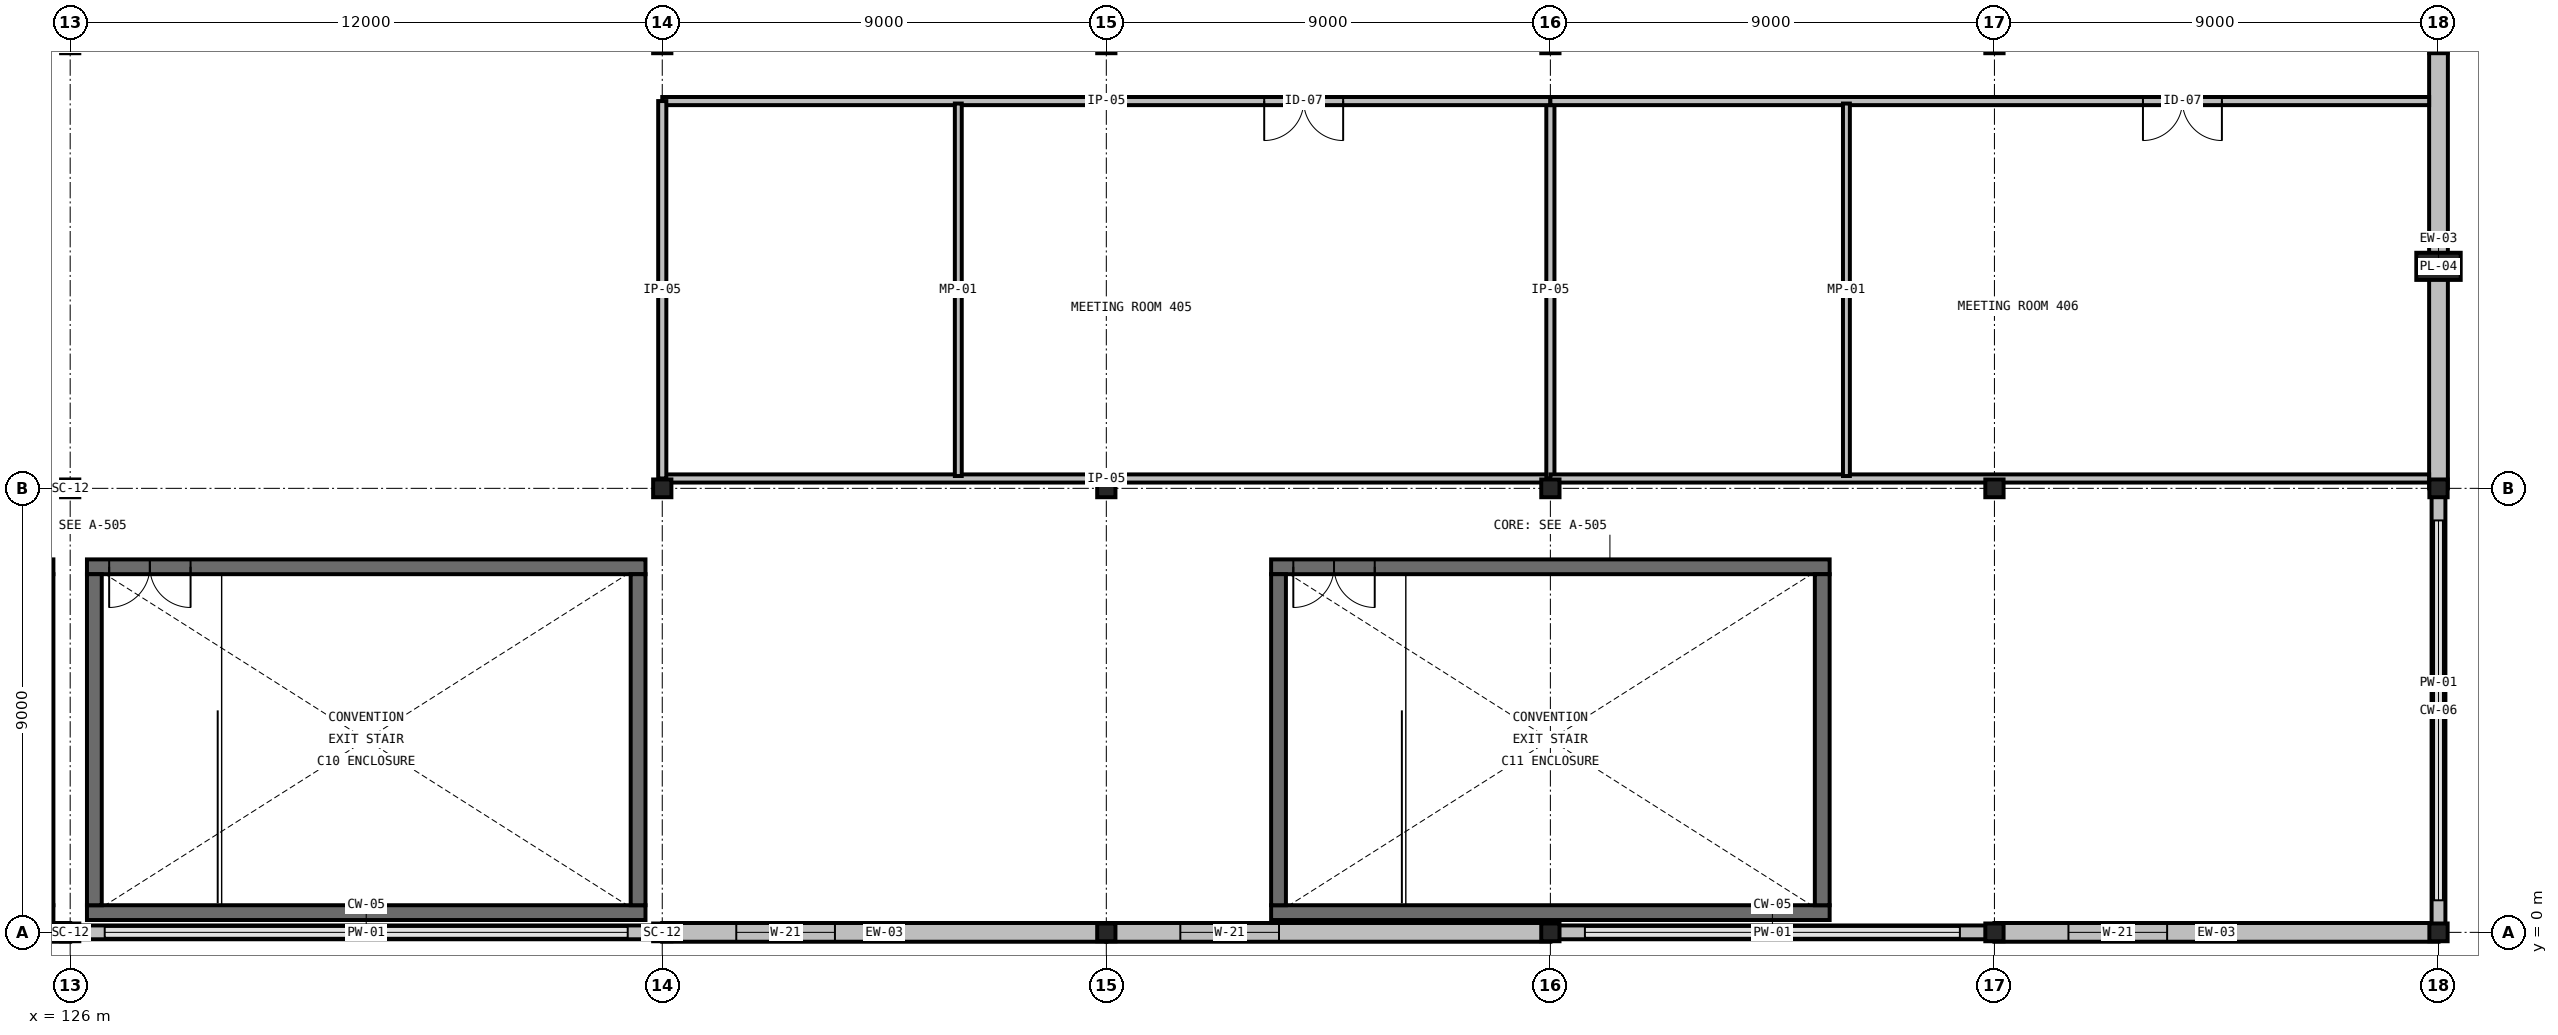
"""IFC4 building model, lengths in metres.
Left out: names, types, materials, properties, quantities, classifications, styles, units other than length and angle.
Written with IfcOpenShell. Run it as: python <this file> out.ifc"""

import sys

from ifc_helpers import new_model, si_unit, direction, frame, frame_2d, origin, origin_2d, place, context, subcontext, project, spatial, rectangle, i_section, extrude, element, fill, save


model = new_model("IFC4")
c1 = context("Model", 3, precision=1e-05, world=origin(), true_north=direction((0.0, 1.0)))
c2 = subcontext(c1, "Body", "Model", "MODEL_VIEW")
j1 = project(units=[si_unit("LENGTHUNIT", "METRE"), si_unit("PLANEANGLEUNIT", "RADIAN")], contexts=[c1])
p1 = place(None, origin())
s1 = spatial("IfcSite", under=j1, at=p1, CompositionType="ELEMENT")
p2 = place(p1, origin())
s2 = spatial("IfcBuilding", under=s1, at=p2, CompositionType="ELEMENT")
p3 = place(p2, frame((0.0, 0.0, 23.4)))
s3 = spatial("IfcBuildingStorey", under=s2, at=p3, CompositionType="ELEMENT", Elevation=23.4)
for number, where, z_axis, x_axis in (
    (1, (126.0, 0.0, 0.0), (0.0, 0.0, 1.0), (1.0, 0.0, 0.0)),
    (2, (126.0, 9.0, 0.0), (0.0, 0.0, 1.0), (1.0, 0.0, 0.0)),
    (3, (126.0, 18.0, 0.0), (0.0, 0.0, 1.0), (1.0, 0.0, 0.0)),
    (4, (138.0, 0.0, 0.0), (0.0, 0.0, 1.0), (1.0, 0.0, 0.0)),
    (5, (138.0, 9.0, 0.0), (0.0, 0.0, 1.0), (1.0, 0.0, 0.0)),
    (6, (138.0, 18.0, 0.0), (0.0, 0.0, 1.0), (1.0, 0.0, 0.0)),
    (7, (147.0, 0.0, 0.0), (0.0, 0.0, 1.0), (1.0, 0.0, 0.0)),
    (8, (147.0, 9.0, 0.0), (0.0, 0.0, 1.0), (1.0, 0.0, 0.0)),
    (9, (147.0, 18.0, 0.0), (0.0, 0.0, 1.0), (1.0, 0.0, 0.0)),
    (10, (156.0, 0.0, 0.0), (0.0, 0.0, 1.0), (1.0, 0.0, 0.0)),
    (11, (156.0, 9.0, 0.0), (0.0, 0.0, 1.0), (1.0, 0.0, 0.0)),
    (12, (156.0, 18.0, 0.0), (0.0, 0.0, 1.0), (1.0, 0.0, 0.0)),
    (13, (165.0, 0.0, 0.0), (0.0, 0.0, 1.0), (1.0, 0.0, 0.0)),
    (14, (165.0, 9.0, 0.0), (0.0, 0.0, 1.0), (1.0, 0.0, 0.0)),
    (15, (165.0, 18.0, 0.0), (0.0, 0.0, 1.0), (1.0, 0.0, 0.0)),
    (16, (174.0, 0.0, 0.0), (0.0, 0.0, 1.0), (1.0, 0.0, 0.0)),
    (17, (174.0, 9.0, 0.0), (0.0, 0.0, 1.0), (1.0, 0.0, 0.0)),
    (18, (174.0, 18.0, 0.0), (0.0, 0.0, 1.0), (1.0, 0.0, 0.0)),
):
    element("IfcColumn", number, at=place(p3, frame(where, z_axis=z_axis, x_axis=x_axis)), inside=s3, PredefinedType="COLUMN", context=c2, shape_type="SweptSolid", body=[
        extrude(i_section(OverallWidth=0.37, OverallDepth=0.36, WebThickness=0.012, FlangeThickness=0.02, FilletRadius=0.031, at=origin_2d()), origin(), (0.0, 0.0, 1.0), 3.85),
    ])
p4 = place(p3, frame((174.0, 13.5, 0.0), z_axis=(0.0, 0.0, 1.0), x_axis=(0.0, 1.0, 0.0)))
e19 = element("IfcColumn", 19, at=p4, inside=s3, PredefinedType="PILASTER", context=c2, shape_type="SweptSolid", body=[
    extrude(rectangle(XDim=0.55, YDim=0.9, at=origin_2d()), origin(), (0.0, 0.0, 1.0), 3.85),
])
p5 = place(p3, frame((125.66, 0.4, 0.0), z_axis=(0.0, 0.0, 1.0), x_axis=(-1.0, 0.0, 0.0)))
e20 = element("IfcWall", 20, at=p5, inside=s3, PredefinedType="SHEAR", context=c2, shape_type="SweptSolid", body=[
    extrude(rectangle(XDim=11.32, YDim=0.3, at=frame_2d((5.66, 0.0))), origin(), (0.0, 0.0, 1.0), 3.85),
])
p6 = place(p3, frame((125.66, 7.41, 0.0), z_axis=(0.0, 0.0, 1.0), x_axis=(-1.0, 0.0, 0.0)))
e21 = element("IfcWall", 21, at=p6, inside=s3, PredefinedType="SHEAR", context=c2, shape_type="SweptSolid", body=[
    extrude(rectangle(XDim=11.32, YDim=0.3, at=frame_2d((5.66, 0.0))), origin(), (0.0, 0.0, 1.0), 3.85),
])
p7 = place(p6, frame((9.22, 0.0, 0.0)))
e22 = element("IfcOpeningElement", 22, at=p7, cuts=e21, PredefinedType="OPENING", context=c2, shape_type="SweptSolid", body=[
    extrude(rectangle(XDim=1.65, YDim=2.25, at=frame_2d((0.825, 1.125))), frame((0.0, 0.165, 0.0), z_axis=(0.0, -1.0, 0.0), x_axis=(1.0, 0.0, 0.0)), (0.0, 0.0, 1.0), 0.33),
])
p8 = place(p3, frame((125.51, 0.55, 0.0), z_axis=(0.0, 0.0, 1.0), x_axis=(0.0, 1.0, 0.0)))
e23 = element("IfcWall", 23, at=p8, inside=s3, PredefinedType="SHEAR", context=c2, shape_type="SweptSolid", body=[
    extrude(rectangle(XDim=6.71, YDim=0.3, at=frame_2d((3.355, 0.0))), origin(), (0.0, 0.0, 1.0), 3.85),
])
p9 = place(p3, frame((137.66, 0.4, 0.0), z_axis=(0.0, 0.0, 1.0), x_axis=(-1.0, 0.0, 0.0)))
e24 = element("IfcWall", 24, at=p9, inside=s3, PredefinedType="SHEAR", context=c2, shape_type="SweptSolid", body=[
    extrude(rectangle(XDim=11.32, YDim=0.3, at=frame_2d((5.66, 0.0))), origin(), (0.0, 0.0, 1.0), 3.85),
])
p10 = place(p3, frame((137.66, 7.41, 0.0), z_axis=(0.0, 0.0, 1.0), x_axis=(-1.0, 0.0, 0.0)))
e25 = element("IfcWall", 25, at=p10, inside=s3, PredefinedType="SHEAR", context=c2, shape_type="SweptSolid", body=[
    extrude(rectangle(XDim=11.32, YDim=0.3, at=frame_2d((5.66, 0.0))), origin(), (0.0, 0.0, 1.0), 3.85),
])
p11 = place(p10, frame((9.22, 0.0, 0.0)))
e26 = element("IfcOpeningElement", 26, at=p11, cuts=e25, PredefinedType="OPENING", context=c2, shape_type="SweptSolid", body=[
    extrude(rectangle(XDim=1.65, YDim=2.25, at=frame_2d((0.825, 1.125))), frame((0.0, 0.165, 0.0), z_axis=(0.0, -1.0, 0.0), x_axis=(1.0, 0.0, 0.0)), (0.0, 0.0, 1.0), 0.33),
])
for number, where, z_axis, x_axis in (
    (27, (126.49, 7.26, 0.0), (0.0, 0.0, 1.0), (0.0, -1.0, 0.0)),
    (28, (137.51, 0.55, 0.0), (0.0, 0.0, 1.0), (0.0, 1.0, 0.0)),
):
    element("IfcWall", number, at=place(p3, frame(where, z_axis=z_axis, x_axis=x_axis)), inside=s3, PredefinedType="SHEAR", context=c2, shape_type="SweptSolid", body=[
        extrude(rectangle(XDim=6.71, YDim=0.3, at=frame_2d((3.355, 0.0))), origin(), (0.0, 0.0, 1.0), 3.85),
    ])
p12 = place(p3, frame((161.66, 0.4, 0.0), z_axis=(0.0, 0.0, 1.0), x_axis=(-1.0, 0.0, 0.0)))
e29 = element("IfcWall", 29, at=p12, inside=s3, PredefinedType="SHEAR", context=c2, shape_type="SweptSolid", body=[
    extrude(rectangle(XDim=11.32, YDim=0.3, at=frame_2d((5.66, 0.0))), origin(), (0.0, 0.0, 1.0), 3.85),
])
p13 = place(p3, frame((161.66, 7.41, 0.0), z_axis=(0.0, 0.0, 1.0), x_axis=(-1.0, 0.0, 0.0)))
e30 = element("IfcWall", 30, at=p13, inside=s3, PredefinedType="SHEAR", context=c2, shape_type="SweptSolid", body=[
    extrude(rectangle(XDim=11.32, YDim=0.3, at=frame_2d((5.66, 0.0))), origin(), (0.0, 0.0, 1.0), 3.85),
])
p14 = place(p13, frame((9.22, 0.0, 0.0)))
e31 = element("IfcOpeningElement", 31, at=p14, cuts=e30, PredefinedType="OPENING", context=c2, shape_type="SweptSolid", body=[
    extrude(rectangle(XDim=1.65, YDim=2.25, at=frame_2d((0.825, 1.125))), frame((0.0, 0.165, 0.0), z_axis=(0.0, -1.0, 0.0), x_axis=(1.0, 0.0, 0.0)), (0.0, 0.0, 1.0), 0.33),
])
for number, where, z_axis, x_axis in (
    (32, (150.49, 7.26, 0.0), (0.0, 0.0, 1.0), (0.0, -1.0, 0.0)),
    (33, (161.51, 0.55, 0.0), (0.0, 0.0, 1.0), (0.0, 1.0, 0.0)),
):
    element("IfcWall", number, at=place(p3, frame(where, z_axis=z_axis, x_axis=x_axis)), inside=s3, PredefinedType="SHEAR", context=c2, shape_type="SweptSolid", body=[
        extrude(rectangle(XDim=6.71, YDim=0.3, at=frame_2d((3.355, 0.0))), origin(), (0.0, 0.0, 1.0), 3.85),
    ])
p15 = place(p3, frame((114.0, 0.0, 0.0), z_axis=(0.0, 0.0, 1.0), x_axis=(1.0, 0.0, 0.0)))
e34 = element("IfcWall", 34, at=p15, inside=s3, PredefinedType="STANDARD", context=c2, shape_type="SweptSolid", body=[
    extrude(rectangle(XDim=12.0, YDim=0.38, at=frame_2d((6.0, 0.0))), origin(), (0.0, 0.0, 1.0), 2.626),
])
p16 = place(p15, frame((1.5, 0.0, 0.85)))
e35 = element("IfcOpeningElement", 35, at=p16, cuts=e34, PredefinedType="OPENING", context=c2, shape_type="SweptSolid", body=[
    extrude(rectangle(XDim=2.0, YDim=1.56, at=frame_2d((1.0, 0.78))), frame((0.0, 0.205, 0.0), z_axis=(0.0, -1.0, 0.0), x_axis=(1.0, 0.0, 0.0)), (0.0, 0.0, 1.0), 0.41),
])
p17 = place(p3, frame((126.0, 0.0, 0.0), z_axis=(0.0, 0.0, 1.0), x_axis=(1.0, 0.0, 0.0)))
e36 = element("IfcWall", 36, at=p17, inside=s3, PredefinedType="PARAPET", context=c2, shape_type="SweptSolid", body=[
    extrude(rectangle(XDim=12.0, YDim=0.28, at=frame_2d((6.0, 0.0))), origin(), (0.0, 0.0, 1.0), 0.2),
])
p18 = place(p3, frame((138.0, 0.0, 0.0), z_axis=(0.0, 0.0, 1.0), x_axis=(1.0, 0.0, 0.0)))
e37 = element("IfcWall", 37, at=p18, inside=s3, PredefinedType="STANDARD", context=c2, shape_type="SweptSolid", body=[
    extrude(rectangle(XDim=9.0, YDim=0.38, at=frame_2d((4.5, 0.0))), origin(), (0.0, 0.0, 1.0), 2.626),
])
p19 = place(p18, frame((1.5, 0.0, 0.85)))
e38 = element("IfcOpeningElement", 38, at=p19, cuts=e37, PredefinedType="OPENING", context=c2, shape_type="SweptSolid", body=[
    extrude(rectangle(XDim=2.0, YDim=1.56, at=frame_2d((1.0, 0.78))), frame((0.0, 0.205, 0.0), z_axis=(0.0, -1.0, 0.0), x_axis=(1.0, 0.0, 0.0)), (0.0, 0.0, 1.0), 0.41),
])
p20 = place(p3, frame((147.0, 0.0, 0.0), z_axis=(0.0, 0.0, 1.0), x_axis=(1.0, 0.0, 0.0)))
e39 = element("IfcWall", 39, at=p20, inside=s3, PredefinedType="STANDARD", context=c2, shape_type="SweptSolid", body=[
    extrude(rectangle(XDim=9.0, YDim=0.38, at=frame_2d((4.5, 0.0))), origin(), (0.0, 0.0, 1.0), 2.626),
])
p21 = place(p20, frame((1.5, 0.0, 0.85)))
e40 = element("IfcOpeningElement", 40, at=p21, cuts=e39, PredefinedType="OPENING", context=c2, shape_type="SweptSolid", body=[
    extrude(rectangle(XDim=2.0, YDim=1.56, at=frame_2d((1.0, 0.78))), frame((0.0, 0.205, 0.0), z_axis=(0.0, -1.0, 0.0), x_axis=(1.0, 0.0, 0.0)), (0.0, 0.0, 1.0), 0.41),
])
p22 = place(p3, frame((156.0, 0.0, 0.0), z_axis=(0.0, 0.0, 1.0), x_axis=(1.0, 0.0, 0.0)))
e41 = element("IfcWall", 41, at=p22, inside=s3, PredefinedType="PARAPET", context=c2, shape_type="SweptSolid", body=[
    extrude(rectangle(XDim=9.0, YDim=0.28, at=frame_2d((4.5, 0.0))), origin(), (0.0, 0.0, 1.0), 0.2),
])
p23 = place(p3, frame((165.0, 0.0, 0.0), z_axis=(0.0, 0.0, 1.0), x_axis=(1.0, 0.0, 0.0)))
e42 = element("IfcWall", 42, at=p23, inside=s3, PredefinedType="STANDARD", context=c2, shape_type="SweptSolid", body=[
    extrude(rectangle(XDim=9.0, YDim=0.38, at=frame_2d((4.5, 0.0))), origin(), (0.0, 0.0, 1.0), 2.626),
])
p24 = place(p23, frame((1.5, 0.0, 0.85)))
e43 = element("IfcOpeningElement", 43, at=p24, cuts=e42, PredefinedType="OPENING", context=c2, shape_type="SweptSolid", body=[
    extrude(rectangle(XDim=2.0, YDim=1.56, at=frame_2d((1.0, 0.78))), frame((0.0, 0.205, 0.0), z_axis=(0.0, -1.0, 0.0), x_axis=(1.0, 0.0, 0.0)), (0.0, 0.0, 1.0), 0.41),
])
p25 = place(p3, frame((174.0, 0.0, 0.0), z_axis=(0.0, 0.0, 1.0), x_axis=(0.0, 1.0, 0.0)))
e44 = element("IfcWall", 44, at=p25, inside=s3, PredefinedType="PARAPET", context=c2, shape_type="SweptSolid", body=[
    extrude(rectangle(XDim=9.0, YDim=0.28, at=frame_2d((4.5, 0.0))), origin(), (0.0, 0.0, 1.0), 0.2),
])
p26 = place(p3, frame((174.0, 9.0, 0.0), z_axis=(0.0, 0.0, 1.0), x_axis=(0.0, 1.0, 0.0)))
e45 = element("IfcWall", 45, at=p26, inside=s3, PredefinedType="STANDARD", context=c2, shape_type="SweptSolid", body=[
    extrude(rectangle(XDim=9.0, YDim=0.38, at=frame_2d((4.5, 0.0))), origin(), (0.0, 0.0, 1.0), 3.119),
])
p27 = place(p3, frame((0.0, 0.14, 3.85), z_axis=(0.0, 0.0, 1.0), x_axis=(1.0, 0.0, 0.0)))
e46 = element("IfcWall", 46, at=p27, inside=s3, PredefinedType="PARAPET", context=c2, shape_type="SweptSolid", body=[
    extrude(rectangle(XDim=174.0, YDim=0.28, at=frame_2d((87.0, 0.0))), origin(), (0.0, 0.0, 1.0), 1.2),
])
p28 = place(p3, frame((173.86, 0.28, 3.85), z_axis=(0.0, 0.0, 1.0), x_axis=(0.0, 1.0, 0.0)))
e47 = element("IfcWall", 47, at=p28, inside=s3, PredefinedType="PARAPET", context=c2, shape_type="SweptSolid", body=[
    extrude(rectangle(XDim=35.44, YDim=0.28, at=frame_2d((17.72, 0.0))), origin(), (0.0, 0.0, 1.0), 1.2),
])
p29 = place(p3, frame((138.0, 9.2, 0.0), z_axis=(0.0, 0.0, 1.0), x_axis=(1.0, 0.0, 0.0)))
e48 = element("IfcWall", 48, at=p29, inside=s3, PredefinedType="PARTITIONING", context=c2, shape_type="SweptSolid", body=[
    extrude(rectangle(XDim=18.0, YDim=0.165, at=frame_2d((9.0, 0.0))), origin(), (0.0, 0.0, 1.0), 3.53),
])
p30 = place(p3, frame((156.0, 9.2, 0.0), z_axis=(0.0, 0.0, 1.0), x_axis=(0.0, 1.0, 0.0)))
e49 = element("IfcWall", 49, at=p30, inside=s3, PredefinedType="PARTITIONING", context=c2, shape_type="SweptSolid", body=[
    extrude(rectangle(XDim=7.65, YDim=0.165, at=frame_2d((3.825, 0.0))), origin(), (0.0, 0.0, 1.0), 2.763),
])
p31 = place(p3, frame((156.0, 16.85, 0.0), z_axis=(0.0, 0.0, 1.0), x_axis=(-1.0, 0.0, 0.0)))
e50 = element("IfcWall", 50, at=p31, inside=s3, PredefinedType="PARTITIONING", context=c2, shape_type="SweptSolid", body=[
    extrude(rectangle(XDim=18.0, YDim=0.165, at=frame_2d((9.0, 0.0))), origin(), (0.0, 0.0, 1.0), 3.53),
])
p32 = place(p31, frame((4.2, 0.0, 0.0)))
e51 = element("IfcOpeningElement", 51, at=p32, cuts=e50, PredefinedType="OPENING", context=c2, shape_type="SweptSolid", body=[
    extrude(rectangle(XDim=1.6, YDim=2.25, at=frame_2d((0.8, 1.125))), frame((0.0, 0.098, 0.0), z_axis=(0.0, -1.0, 0.0), x_axis=(1.0, 0.0, 0.0)), (0.0, 0.0, 1.0), 0.195),
])
p33 = place(p3, frame((138.0, 16.85, 0.0), z_axis=(0.0, 0.0, 1.0), x_axis=(0.0, -1.0, 0.0)))
e52 = element("IfcWall", 52, at=p33, inside=s3, PredefinedType="PARTITIONING", context=c2, shape_type="SweptSolid", body=[
    extrude(rectangle(XDim=7.65, YDim=0.165, at=frame_2d((3.825, 0.0))), origin(), (0.0, 0.0, 1.0), 2.763),
])
p34 = place(p3, frame((156.0, 9.2, 0.0), z_axis=(0.0, 0.0, 1.0), x_axis=(1.0, 0.0, 0.0)))
e53 = element("IfcWall", 53, at=p34, inside=s3, PredefinedType="PARTITIONING", context=c2, shape_type="SweptSolid", body=[
    extrude(rectangle(XDim=17.81, YDim=0.165, at=frame_2d((8.905, 0.0))), origin(), (0.0, 0.0, 1.0), 3.53),
])
p35 = place(p3, frame((173.81, 16.85, 0.0), z_axis=(0.0, 0.0, 1.0), x_axis=(-1.0, 0.0, 0.0)))
e54 = element("IfcWall", 54, at=p35, inside=s3, PredefinedType="PARTITIONING", context=c2, shape_type="SweptSolid", body=[
    extrude(rectangle(XDim=17.81, YDim=0.165, at=frame_2d((8.905, 0.0))), origin(), (0.0, 0.0, 1.0), 3.53),
])
p36 = place(p35, frame((4.2, 0.0, 0.0)))
e55 = element("IfcOpeningElement", 55, at=p36, cuts=e54, PredefinedType="OPENING", context=c2, shape_type="SweptSolid", body=[
    extrude(rectangle(XDim=1.6, YDim=2.25, at=frame_2d((0.8, 1.125))), frame((0.0, 0.098, 0.0), z_axis=(0.0, -1.0, 0.0), x_axis=(1.0, 0.0, 0.0)), (0.0, 0.0, 1.0), 0.195),
])
for number, where, z_axis, x_axis in (
    (56, (144.0, 9.25, 0.0), (0.0, 0.0, 1.0), (0.0, 1.0, 0.0)),
    (57, (162.0, 9.25, 0.0), (0.0, 0.0, 1.0), (0.0, 1.0, 0.0)),
):
    element("IfcWall", number, at=place(p3, frame(where, z_axis=z_axis, x_axis=x_axis)), inside=s3, PredefinedType="MOVABLE", context=c2, shape_type="SweptSolid", body=[
        extrude(rectangle(XDim=7.55, YDim=0.14, at=frame_2d((3.775, 0.0))), origin(), (0.0, 0.0, 1.0), 3.53),
    ])
p37 = place(p11, origin())
e58 = element("IfcDoor", 58, at=p37, inside=s3, OperationType="DOUBLE_DOOR_SINGLE_SWING", PredefinedType="DOOR", context=c2, shape_type="SweptSolid", body=[
    extrude(rectangle(XDim=1.65, YDim=2.25, at=frame_2d((0.825, 1.125))), frame((0.0, 0.025, 0.0), z_axis=(0.0, -1.0, 0.0), x_axis=(1.0, 0.0, 0.0)), (0.0, 0.0, 1.0), 0.05),
])
fill(e26, e58)
p38 = place(p14, origin())
e59 = element("IfcDoor", 59, at=p38, inside=s3, OperationType="DOUBLE_DOOR_SINGLE_SWING", PredefinedType="DOOR", context=c2, shape_type="SweptSolid", body=[
    extrude(rectangle(XDim=1.65, YDim=2.25, at=frame_2d((0.825, 1.125))), frame((0.0, 0.025, 0.0), z_axis=(0.0, -1.0, 0.0), x_axis=(1.0, 0.0, 0.0)), (0.0, 0.0, 1.0), 0.05),
])
fill(e31, e59)
p39 = place(p19, origin())
e60 = element("IfcWindow", 60, at=p39, inside=s3, PartitioningType="DOUBLE_PANEL_VERTICAL", PredefinedType="WINDOW", context=c2, shape_type="SweptSolid", body=[
    extrude(rectangle(XDim=2.0, YDim=1.56, at=frame_2d((1.0, 0.78))), frame((0.0, 0.03, 0.0), z_axis=(0.0, -1.0, 0.0), x_axis=(1.0, 0.0, 0.0)), (0.0, 0.0, 1.0), 0.06),
])
fill(e38, e60)
p40 = place(p21, origin())
e61 = element("IfcWindow", 61, at=p40, inside=s3, PartitioningType="DOUBLE_PANEL_VERTICAL", PredefinedType="WINDOW", context=c2, shape_type="SweptSolid", body=[
    extrude(rectangle(XDim=2.0, YDim=1.56, at=frame_2d((1.0, 0.78))), frame((0.0, 0.03, 0.0), z_axis=(0.0, -1.0, 0.0), x_axis=(1.0, 0.0, 0.0)), (0.0, 0.0, 1.0), 0.06),
])
fill(e40, e61)
p41 = place(p24, origin())
e62 = element("IfcWindow", 62, at=p41, inside=s3, PartitioningType="DOUBLE_PANEL_VERTICAL", PredefinedType="WINDOW", context=c2, shape_type="SweptSolid", body=[
    extrude(rectangle(XDim=2.0, YDim=1.56, at=frame_2d((1.0, 0.78))), frame((0.0, 0.03, 0.0), z_axis=(0.0, -1.0, 0.0), x_axis=(1.0, 0.0, 0.0)), (0.0, 0.0, 1.0), 0.06),
])
fill(e43, e62)
p42 = place(p3, frame((0.0, 0.0, 3.53)))
p43 = place(p42, frame((142.5, 13.5, 0.0)))
p44 = place(p43, frame((0.0, 0.0, 0.27)))
e63 = element("IfcWindow", 63, at=p44, inside=s3, PartitioningType="SINGLE_PANEL", PredefinedType="SKYLIGHT", context=c2, shape_type="SweptSolid", body=[
    extrude(rectangle(XDim=2.4, YDim=2.4, at=origin_2d()), origin(), (0.0, 0.0, 1.0), 0.05),
])
p45 = place(p32, origin())
e64 = element("IfcDoor", 64, at=p45, inside=s3, OperationType="DOUBLE_DOOR_SINGLE_SWING", PredefinedType="DOOR", context=c2, shape_type="SweptSolid", body=[
    extrude(rectangle(XDim=1.6, YDim=2.25, at=frame_2d((0.8, 1.125))), frame((0.0, 0.025, 0.0), z_axis=(0.0, -1.0, 0.0), x_axis=(1.0, 0.0, 0.0)), (0.0, 0.0, 1.0), 0.05),
])
fill(e51, e64)
p46 = place(p36, origin())
e65 = element("IfcDoor", 65, at=p46, inside=s3, OperationType="DOUBLE_DOOR_SINGLE_SWING", PredefinedType="DOOR", context=c2, shape_type="SweptSolid", body=[
    extrude(rectangle(XDim=1.6, YDim=2.25, at=frame_2d((0.8, 1.125))), frame((0.0, 0.025, 0.0), z_axis=(0.0, -1.0, 0.0), x_axis=(1.0, 0.0, 0.0)), (0.0, 0.0, 1.0), 0.05),
])
fill(e55, e65)
save(model, sys.argv[1])
